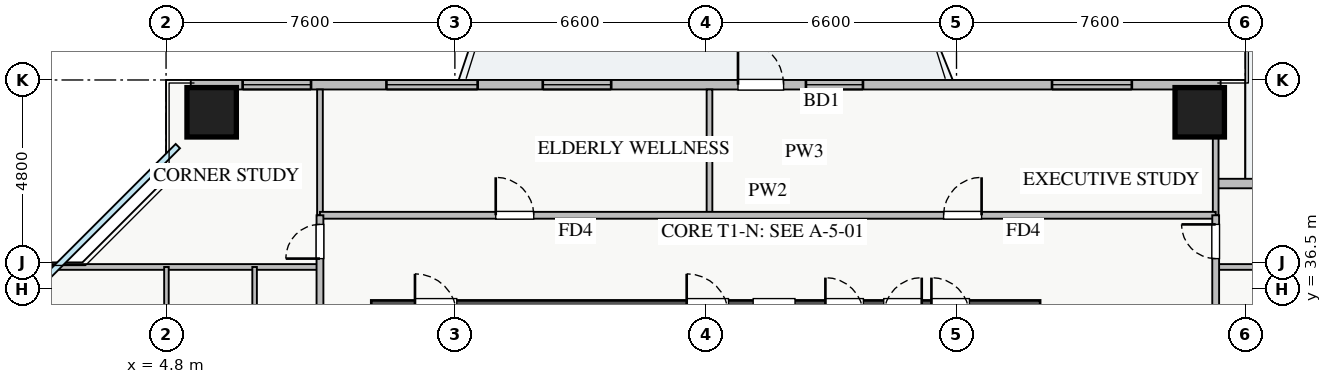
"""IFC4 building model, lengths in metres.
Left out: names, types, materials, properties, quantities, classifications, styles, units other than length and angle.
Written with IfcOpenShell. Run it as: python <this file> out.ifc"""

import sys

from ifc_helpers import new_model, si_unit, direction, frame, frame_2d, origin, origin_2d, place, context, subcontext, project, spatial, rectangle, extrude, source, transform, mapped, element, fill, save


model = new_model("IFC4")
c1 = context("Model", 3, precision=1e-05, world=origin(), true_north=direction((0.0, 1.0)))
c2 = subcontext(c1, "Body", "Model", "MODEL_VIEW")
j1 = project(units=[si_unit("LENGTHUNIT", "METRE"), si_unit("PLANEANGLEUNIT", "RADIAN")], contexts=[c1])
p1 = place(None, origin())
s1 = spatial("IfcSite", under=j1, at=p1, CompositionType="ELEMENT")
p2 = place(p1, origin())
s2 = spatial("IfcBuilding", under=s1, at=p2, CompositionType="ELEMENT")
p3 = place(p2, frame((0.0, 0.0, 82.75)))
s3 = spatial("IfcBuildingStorey", under=s2, at=p3, CompositionType="ELEMENT", Elevation=82.75)
p4 = place(p3, frame((10.2, 35.8, 0.0), z_axis=(0.0, 0.0, 1.0), x_axis=(1.0, 0.0, 0.0)))
e1 = element("IfcWall", 1, at=p4, inside=s3, PredefinedType="SHEAR", context=c2, shape_type="SweptSolid", body=[
    extrude(rectangle(XDim=17.6, YDim=0.8, at=frame_2d((8.8, 0.0))), origin(), (0.0, 0.0, 1.0), 3.25),
])
p5 = place(p4, frame((1.15, 0.0, 0.0)))
e2 = element("IfcOpeningElement", 2, at=p5, cuts=e1, PredefinedType="OPENING", context=c2, shape_type="SweptSolid", body=[
    extrude(rectangle(XDim=1.1, YDim=2.05, at=frame_2d((0.55, 1.025))), frame((0.0, 0.41, 0.0), z_axis=(0.0, -1.0, 0.0), x_axis=(1.0, 0.0, 0.0)), (0.0, 0.0, 1.0), 0.82),
])
p6 = place(p4, frame((8.3, 0.0, 0.0)))
e3 = element("IfcOpeningElement", 3, at=p6, cuts=e1, PredefinedType="OPENING", context=c2, shape_type="SweptSolid", body=[
    extrude(rectangle(XDim=1.1, YDim=2.05, at=frame_2d((0.55, 1.025))), frame((0.0, 0.41, 0.0), z_axis=(0.0, -1.0, 0.0), x_axis=(1.0, 0.0, 0.0)), (0.0, 0.0, 1.0), 0.82),
])
p7 = place(p4, frame((10.05, 0.0, 0.0)))
e4 = element("IfcOpeningElement", 4, at=p7, cuts=e1, PredefinedType="OPENING", context=c2, shape_type="SweptSolid", body=[
    extrude(rectangle(XDim=1.1, YDim=2.05, at=frame_2d((0.55, 1.025))), frame((0.0, 0.41, 0.0), z_axis=(0.0, -1.0, 0.0), x_axis=(1.0, 0.0, 0.0)), (0.0, 0.0, 1.0), 0.82),
])
p8 = place(p4, frame((14.74, 0.0, 0.0)))
e5 = element("IfcOpeningElement", 5, at=p8, cuts=e1, PredefinedType="OPENING", context=c2, shape_type="SweptSolid", body=[
    extrude(rectangle(XDim=1.0, YDim=2.05, at=frame_2d((0.5, 1.025))), frame((0.0, 0.41, 0.0), z_axis=(0.0, -1.0, 0.0), x_axis=(1.0, 0.0, 0.0)), (0.0, 0.0, 1.0), 0.82),
])
p9 = place(p4, frame((11.95, 0.0, 0.0)))
e6 = element("IfcOpeningElement", 6, at=p9, cuts=e1, PredefinedType="OPENING", context=c2, shape_type="SweptSolid", body=[
    extrude(rectangle(XDim=1.0, YDim=2.05, at=frame_2d((0.5, 1.025))), frame((0.0, 0.41, 0.0), z_axis=(0.0, -1.0, 0.0), x_axis=(1.0, 0.0, 0.0)), (0.0, 0.0, 1.0), 0.82),
])
p10 = place(p4, frame((13.485, 0.0, 0.0)))
e7 = element("IfcOpeningElement", 7, at=p10, cuts=e1, PredefinedType="OPENING", context=c2, shape_type="SweptSolid", body=[
    extrude(rectangle(XDim=1.0, YDim=2.05, at=frame_2d((0.5, 1.025))), frame((0.0, 0.41, 0.0), z_axis=(0.0, -1.0, 0.0), x_axis=(1.0, 0.0, 0.0)), (0.0, 0.0, 1.0), 0.82),
])
m1 = source(origin(), c2, "Body", "SweptSolid", [
    extrude(rectangle(XDim=1.3, YDim=1.3, at=origin_2d()), origin(), (0.0, 0.0, 1.0), 3.25),
])
for number, where, z_axis, x_axis in (
    (8, (32.0, 41.15, 0.0), (0.0, 0.0, 1.0), (1.0, 0.0, 0.0)),
    (9, (6.0, 41.15, 0.0), (0.0, 0.0, 1.0), (1.0, 0.0, 0.0)),
):
    element("IfcColumn", number, at=place(p3, frame(where, z_axis=z_axis, x_axis=x_axis)), inside=s3, PredefinedType="COLUMN", context=c2, shape_type="MappedRepresentation", body=[
        mapped(m1, transform((0.0, 0.0, 0.0), x_axis=(1.0, 0.0, 0.0), y_axis=(0.0, 1.0, 0.0), z_axis=(0.0, 0.0, 1.0), scale=1.0)),
    ])
p11 = place(p3, frame((5.45, 41.875, 0.0), z_axis=(0.0, 0.0, 1.0), x_axis=(1.0, 0.0, 0.0)))
e10 = element("IfcWall", 10, at=p11, inside=s3, PredefinedType="STANDARD", context=c2, shape_type="SweptSolid", body=[
    extrude(rectangle(XDim=27.1, YDim=0.25, at=frame_2d((13.55, 0.0))), origin(), (0.0, 0.0, 1.0), 2.61),
])
p12 = place(p11, frame((14.4, 0.0, 0.0)))
e11 = element("IfcOpeningElement", 11, at=p12, cuts=e10, PredefinedType="OPENING", context=c2, shape_type="SweptSolid", body=[
    extrude(rectangle(XDim=1.2, YDim=2.1, at=frame_2d((0.6, 1.05))), frame((0.0, 0.135, 0.0), z_axis=(0.0, -1.0, 0.0), x_axis=(1.0, 0.0, 0.0)), (0.0, 0.0, 1.0), 0.27),
])
p13 = place(p11, frame((1.365, 0.0, 0.9)))
e12 = element("IfcOpeningElement", 12, at=p13, cuts=e10, PredefinedType="OPENING", context=c2, shape_type="SweptSolid", body=[
    extrude(rectangle(XDim=1.8, YDim=1.5, at=frame_2d((0.9, 0.75))), frame((0.0, 0.135, 0.0), z_axis=(0.0, -1.0, 0.0), x_axis=(1.0, 0.0, 0.0)), (0.0, 0.0, 1.0), 0.27),
])
p14 = place(p11, frame((9.263, 0.0, 0.9)))
e13 = element("IfcOpeningElement", 13, at=p14, cuts=e10, PredefinedType="OPENING", context=c2, shape_type="SweptSolid", body=[
    extrude(rectangle(XDim=1.8, YDim=1.45, at=frame_2d((0.9, 0.725))), frame((0.0, 0.135, 0.0), z_axis=(0.0, -1.0, 0.0), x_axis=(1.0, 0.0, 0.0)), (0.0, 0.0, 1.0), 0.27),
])
p15 = place(p11, frame((16.188, 0.0, 0.9)))
e14 = element("IfcOpeningElement", 14, at=p15, cuts=e10, PredefinedType="OPENING", context=c2, shape_type="SweptSolid", body=[
    extrude(rectangle(XDim=1.5, YDim=1.45, at=frame_2d((0.75, 0.725))), frame((0.0, 0.135, 0.0), z_axis=(0.0, -1.0, 0.0), x_axis=(1.0, 0.0, 0.0)), (0.0, 0.0, 1.0), 0.27),
])
p16 = place(p11, frame((22.663, 0.0, 0.9)))
e15 = element("IfcOpeningElement", 15, at=p16, cuts=e10, PredefinedType="OPENING", context=c2, shape_type="SweptSolid", body=[
    extrude(rectangle(XDim=2.1, YDim=1.48, at=frame_2d((1.05, 0.74))), frame((0.0, 0.135, 0.0), z_axis=(0.0, -1.0, 0.0), x_axis=(1.0, 0.0, 0.0)), (0.0, 0.0, 1.0), 0.27),
])
p17 = place(p11, frame((5.149, 0.0, 0.9)))
e16 = element("IfcOpeningElement", 16, at=p17, cuts=e10, PredefinedType="OPENING", context=c2, shape_type="SweptSolid", body=[
    extrude(rectangle(XDim=2.4, YDim=1.5, at=frame_2d((1.2, 0.75))), frame((0.0, 0.135, 0.0), z_axis=(0.0, -1.0, 0.0), x_axis=(1.0, 0.0, 0.0)), (0.0, 0.0, 1.0), 0.27),
])
p18 = place(p3, frame((32.475, 39.275, 0.0), z_axis=(0.0, 0.0, 1.0), x_axis=(1.0, 0.0, 0.0)))
e17 = element("IfcWall", 17, at=p18, inside=s3, PredefinedType="STANDARD", context=c2, shape_type="SweptSolid", body=[
    extrude(rectangle(XDim=2.8, YDim=0.25, at=frame_2d((1.4, 0.0))), origin(), (0.0, 0.0, 1.0), 2.61),
])
p19 = place(p18, frame((1.05, 0.0, 0.0)))
e18 = element("IfcOpeningElement", 18, at=p19, cuts=e17, PredefinedType="OPENING", context=c2, shape_type="SweptSolid", body=[
    extrude(rectangle(XDim=1.2, YDim=2.1, at=frame_2d((0.6, 1.05))), frame((0.0, 0.135, 0.0), z_axis=(0.0, -1.0, 0.0), x_axis=(1.0, 0.0, 0.0)), (0.0, 0.0, 1.0), 0.27),
])
p20 = place(p3, frame((19.1, 38.44, 0.0), z_axis=(0.0, 0.0, 1.0), x_axis=(0.0, 1.0, 0.0)))
e19 = element("IfcWall", 19, at=p20, inside=s3, PredefinedType="PARTITIONING", context=c2, shape_type="SweptSolid", body=[
    extrude(rectangle(XDim=3.31, YDim=0.15, at=frame_2d((1.655, 0.0))), origin(), (0.0, 0.0, 1.0), 2.865),
])
for number, where, z_axis, x_axis in (
    (20, (8.85, 38.44, 0.0), (0.0, 0.0, 1.0), (0.0, 1.0, 0.0)),
    (21, (32.42, 38.44, 0.0), (0.0, 0.0, 1.0), (0.0, 1.0, 0.0)),
):
    element("IfcWall", number, at=place(p3, frame(where, z_axis=z_axis, x_axis=x_axis)), inside=s3, PredefinedType="PARTITIONING", context=c2, shape_type="SweptSolid", body=[
        extrude(rectangle(XDim=3.31, YDim=0.15, at=frame_2d((1.655, 0.0))), origin(), (0.0, 0.0, 1.0), 3.07),
    ])
p21 = place(p3, frame((8.85, 38.44, 0.0), z_axis=(0.0, 0.0, 1.0), x_axis=(1.0, 0.0, 0.0)))
e22 = element("IfcWall", 22, at=p21, inside=s3, PredefinedType="PARTITIONING", context=c2, shape_type="SweptSolid", body=[
    extrude(rectangle(XDim=23.57, YDim=0.18, at=frame_2d((11.785, 0.0))), origin(), (0.0, 0.0, 1.0), 3.07),
])
p22 = place(p21, frame((4.625, 0.0, 0.0)))
e23 = element("IfcOpeningElement", 23, at=p22, cuts=e22, PredefinedType="OPENING", context=c2, shape_type="SweptSolid", body=[
    extrude(rectangle(XDim=1.0, YDim=2.05, at=frame_2d((0.5, 1.025))), frame((0.0, 0.1, 0.0), z_axis=(0.0, -1.0, 0.0), x_axis=(1.0, 0.0, 0.0)), (0.0, 0.0, 1.0), 0.2),
])
p23 = place(p21, frame((16.41, 0.0, 0.0)))
e24 = element("IfcOpeningElement", 24, at=p23, cuts=e22, PredefinedType="OPENING", context=c2, shape_type="SweptSolid", body=[
    extrude(rectangle(XDim=1.0, YDim=2.05, at=frame_2d((0.5, 1.025))), frame((0.0, 0.1, 0.0), z_axis=(0.0, -1.0, 0.0), x_axis=(1.0, 0.0, 0.0)), (0.0, 0.0, 1.0), 0.2),
])
p24 = place(p3, frame((0.25, 37.08, 0.0), z_axis=(0.0, 0.0, 1.0), x_axis=(1.0, 0.0, 0.0)))
e25 = element("IfcWall", 25, at=p24, inside=s3, PredefinedType="PARTITIONING", context=c2, shape_type="SweptSolid", body=[
    extrude(rectangle(XDim=8.6, YDim=0.15, at=frame_2d((4.3, 0.0))), origin(), (0.0, 0.0, 1.0), 3.07),
])
for number, where, z_axis, x_axis in (
    (26, (4.81, 32.14, 0.0), (0.0, 0.0, 1.0), (0.0, 1.0, 0.0)),
    (27, (7.13, 32.14, 0.0), (0.0, 0.0, 1.0), (0.0, 1.0, 0.0)),
):
    element("IfcWall", number, at=place(p3, frame(where, z_axis=z_axis, x_axis=x_axis)), inside=s3, PredefinedType="PLUMBINGWALL", context=c2, shape_type="SweptSolid", body=[
        extrude(rectangle(XDim=4.94, YDim=0.12, at=frame_2d((2.47, 0.0))), origin(), (0.0, 0.0, 1.0), 3.07),
    ])
p25 = place(p3, frame((8.85, 7.21, 0.0), z_axis=(0.0, 0.0, 1.0), x_axis=(0.0, 1.0, 0.0)))
e28 = element("IfcWall", 28, at=p25, inside=s3, PredefinedType="PARTITIONING", context=c2, shape_type="SweptSolid", body=[
    extrude(rectangle(XDim=31.23, YDim=0.18, at=frame_2d((15.615, 0.0))), origin(), (0.0, 0.0, 1.0), 3.07),
])
p26 = place(p25, frame((30.09, 0.0, 0.0)))
e29 = element("IfcOpeningElement", 29, at=p26, cuts=e28, PredefinedType="OPENING", context=c2, shape_type="SweptSolid", body=[
    extrude(rectangle(XDim=0.9, YDim=2.05, at=frame_2d((0.45, 1.025))), frame((0.0, 0.1, 0.0), z_axis=(0.0, -1.0, 0.0), x_axis=(1.0, 0.0, 0.0)), (0.0, 0.0, 1.0), 0.2),
])
p27 = place(p25, frame((0.24, 0.0, 0.0)))
e30 = element("IfcOpeningElement", 30, at=p27, cuts=e28, PredefinedType="OPENING", context=c2, shape_type="SweptSolid", body=[
    extrude(rectangle(XDim=0.9, YDim=2.05, at=frame_2d((0.45, 1.025))), frame((0.0, 0.1, 0.0), z_axis=(0.0, -1.0, 0.0), x_axis=(1.0, 0.0, 0.0)), (0.0, 0.0, 1.0), 0.2),
])
p28 = place(p25, frame((5.895, 0.0, 0.0)))
e31 = element("IfcOpeningElement", 31, at=p28, cuts=e28, PredefinedType="OPENING", context=c2, shape_type="SweptSolid", body=[
    extrude(rectangle(XDim=1.0, YDim=2.05, at=frame_2d((0.5, 1.025))), frame((0.0, 0.1, 0.0), z_axis=(0.0, -1.0, 0.0), x_axis=(1.0, 0.0, 0.0)), (0.0, 0.0, 1.0), 0.2),
])
p29 = place(p25, frame((12.885, 0.0, 0.0)))
e32 = element("IfcOpeningElement", 32, at=p29, cuts=e28, PredefinedType="OPENING", context=c2, shape_type="SweptSolid", body=[
    extrude(rectangle(XDim=1.0, YDim=2.05, at=frame_2d((0.5, 1.025))), frame((0.0, 0.1, 0.0), z_axis=(0.0, -1.0, 0.0), x_axis=(1.0, 0.0, 0.0)), (0.0, 0.0, 1.0), 0.2),
])
p30 = place(p25, frame((21.96, 0.0, 0.0)))
e33 = element("IfcOpeningElement", 33, at=p30, cuts=e28, PredefinedType="OPENING", context=c2, shape_type="SweptSolid", body=[
    extrude(rectangle(XDim=1.0, YDim=2.05, at=frame_2d((0.5, 1.025))), frame((0.0, 0.1, 0.0), z_axis=(0.0, -1.0, 0.0), x_axis=(1.0, 0.0, 0.0)), (0.0, 0.0, 1.0), 0.2),
])
p31 = place(p3, frame((32.42, 37.08, 0.0), z_axis=(0.0, 0.0, 1.0), x_axis=(1.0, 0.0, 0.0)))
e34 = element("IfcWall", 34, at=p31, inside=s3, PredefinedType="PARTITIONING", context=c2, shape_type="SweptSolid", body=[
    extrude(rectangle(XDim=5.33, YDim=0.15, at=frame_2d((2.665, 0.0))), origin(), (0.0, 0.0, 1.0), 3.07),
])
p32 = place(p3, frame((32.42, 7.21, 0.0), z_axis=(0.0, 0.0, 1.0), x_axis=(0.0, 1.0, 0.0)))
e35 = element("IfcWall", 35, at=p32, inside=s3, PredefinedType="PARTITIONING", context=c2, shape_type="SweptSolid", body=[
    extrude(rectangle(XDim=31.23, YDim=0.18, at=frame_2d((15.615, 0.0))), origin(), (0.0, 0.0, 1.0), 2.865),
])
p33 = place(p32, frame((30.09, 0.0, 0.0)))
e36 = element("IfcOpeningElement", 36, at=p33, cuts=e35, PredefinedType="OPENING", context=c2, shape_type="SweptSolid", body=[
    extrude(rectangle(XDim=0.9, YDim=2.05, at=frame_2d((0.45, 1.025))), frame((0.0, 0.1, 0.0), z_axis=(0.0, -1.0, 0.0), x_axis=(1.0, 0.0, 0.0)), (0.0, 0.0, 1.0), 0.2),
])
p34 = place(p32, frame((0.415, 0.0, 0.0)))
e37 = element("IfcOpeningElement", 37, at=p34, cuts=e35, PredefinedType="OPENING", context=c2, shape_type="SweptSolid", body=[
    extrude(rectangle(XDim=0.9, YDim=2.05, at=frame_2d((0.45, 1.025))), frame((0.0, 0.1, 0.0), z_axis=(0.0, -1.0, 0.0), x_axis=(1.0, 0.0, 0.0)), (0.0, 0.0, 1.0), 0.2),
])
p35 = place(p32, frame((5.675, 0.0, 0.0)))
e38 = element("IfcOpeningElement", 38, at=p35, cuts=e35, PredefinedType="OPENING", context=c2, shape_type="SweptSolid", body=[
    extrude(rectangle(XDim=1.0, YDim=2.05, at=frame_2d((0.5, 1.025))), frame((0.0, 0.1, 0.0), z_axis=(0.0, -1.0, 0.0), x_axis=(1.0, 0.0, 0.0)), (0.0, 0.0, 1.0), 0.2),
])
p36 = place(p32, frame((12.575, 0.0, 0.0)))
e39 = element("IfcOpeningElement", 39, at=p36, cuts=e35, PredefinedType="OPENING", context=c2, shape_type="SweptSolid", body=[
    extrude(rectangle(XDim=1.0, YDim=2.05, at=frame_2d((0.5, 1.025))), frame((0.0, 0.1, 0.0), z_axis=(0.0, -1.0, 0.0), x_axis=(1.0, 0.0, 0.0)), (0.0, 0.0, 1.0), 0.2),
])
p37 = place(p32, frame((22.5, 0.0, 0.0)))
e40 = element("IfcOpeningElement", 40, at=p37, cuts=e35, PredefinedType="OPENING", context=c2, shape_type="SweptSolid", body=[
    extrude(rectangle(XDim=1.0, YDim=2.05, at=frame_2d((0.5, 1.025))), frame((0.0, 0.1, 0.0), z_axis=(0.0, -1.0, 0.0), x_axis=(1.0, 0.0, 0.0)), (0.0, 0.0, 1.0), 0.2),
])
m2 = source(origin(), c2, "Body", "SweptSolid", [
    extrude(rectangle(XDim=1.2, YDim=2.1, at=frame_2d((0.6, 1.05))), frame((0.0, 0.025, 0.0), z_axis=(0.0, -1.0, 0.0), x_axis=(1.0, 0.0, 0.0)), (0.0, 0.0, 1.0), 0.05),
])
p38 = place(p12, origin())
e41 = element("IfcDoor", 41, at=p38, inside=s3, OperationType="SINGLE_SWING_LEFT", PredefinedType="DOOR", context=c2, shape_type="MappedRepresentation", body=[
    mapped(m2, transform((0.0, 0.0, 0.0), x_axis=(1.0, 0.0, 0.0), y_axis=(0.0, 1.0, 0.0), z_axis=(0.0, 0.0, 1.0), scale=1.0)),
])
fill(e11, e41)
m3 = source(origin(), c2, "Body", "SweptSolid", [
    extrude(rectangle(XDim=1.8, YDim=1.5, at=frame_2d((0.9, 0.75))), frame((0.0, 0.03, 0.0), z_axis=(0.0, -1.0, 0.0), x_axis=(1.0, 0.0, 0.0)), (0.0, 0.0, 1.0), 0.06),
])
p39 = place(p13, origin())
e42 = element("IfcWindow", 42, at=p39, inside=s3, PartitioningType="TRIPLE_PANEL_VERTICAL", PredefinedType="WINDOW", context=c2, shape_type="MappedRepresentation", body=[
    mapped(m3, transform((0.0, 0.0, 0.0), x_axis=(1.0, 0.0, 0.0), y_axis=(0.0, 1.0, 0.0), z_axis=(0.0, 0.0, 1.0), scale=1.0)),
])
fill(e12, e42)
m4 = source(origin(), c2, "Body", "SweptSolid", [
    extrude(rectangle(XDim=1.8, YDim=1.45, at=frame_2d((0.9, 0.725))), frame((0.0, 0.03, 0.0), z_axis=(0.0, -1.0, 0.0), x_axis=(1.0, 0.0, 0.0)), (0.0, 0.0, 1.0), 0.06),
])
p40 = place(p14, origin())
e43 = element("IfcWindow", 43, at=p40, inside=s3, PartitioningType="DOUBLE_PANEL_VERTICAL", PredefinedType="WINDOW", context=c2, shape_type="MappedRepresentation", body=[
    mapped(m4, transform((0.0, 0.0, 0.0), x_axis=(1.0, 0.0, 0.0), y_axis=(0.0, 1.0, 0.0), z_axis=(0.0, 0.0, 1.0), scale=1.0)),
])
fill(e13, e43)
m5 = source(origin(), c2, "Body", "SweptSolid", [
    extrude(rectangle(XDim=1.5, YDim=1.45, at=frame_2d((0.75, 0.725))), frame((0.0, 0.03, 0.0), z_axis=(0.0, -1.0, 0.0), x_axis=(1.0, 0.0, 0.0)), (0.0, 0.0, 1.0), 0.06),
])
p41 = place(p15, origin())
e44 = element("IfcWindow", 44, at=p41, inside=s3, PartitioningType="DOUBLE_PANEL_VERTICAL", PredefinedType="WINDOW", context=c2, shape_type="MappedRepresentation", body=[
    mapped(m5, transform((0.0, 0.0, 0.0), x_axis=(1.0, 0.0, 0.0), y_axis=(0.0, 1.0, 0.0), z_axis=(0.0, 0.0, 1.0), scale=1.0)),
])
fill(e14, e44)
m6 = source(origin(), c2, "Body", "SweptSolid", [
    extrude(rectangle(XDim=2.1, YDim=1.48, at=frame_2d((1.05, 0.74))), frame((0.0, 0.03, 0.0), z_axis=(0.0, -1.0, 0.0), x_axis=(1.0, 0.0, 0.0)), (0.0, 0.0, 1.0), 0.06),
])
p42 = place(p16, origin())
e45 = element("IfcWindow", 45, at=p42, inside=s3, PartitioningType="TRIPLE_PANEL_VERTICAL", PredefinedType="WINDOW", context=c2, shape_type="MappedRepresentation", body=[
    mapped(m6, transform((0.0, 0.0, 0.0), x_axis=(1.0, 0.0, 0.0), y_axis=(0.0, 1.0, 0.0), z_axis=(0.0, 0.0, 1.0), scale=1.0)),
])
fill(e15, e45)
m7 = source(origin(), c2, "Body", "SweptSolid", [
    extrude(rectangle(XDim=1.0, YDim=2.05, at=frame_2d((0.5, 1.025))), frame((0.0, 0.025, 0.0), z_axis=(0.0, -1.0, 0.0), x_axis=(1.0, 0.0, 0.0)), (0.0, 0.0, 1.0), 0.05),
])
p43 = place(p22, origin())
e46 = element("IfcDoor", 46, at=p43, inside=s3, OperationType="SINGLE_SWING_LEFT", PredefinedType="DOOR", context=c2, shape_type="MappedRepresentation", body=[
    mapped(m7, transform((0.0, 0.0, 0.0), x_axis=(1.0, 0.0, 0.0), y_axis=(0.0, 1.0, 0.0), z_axis=(0.0, 0.0, 1.0), scale=1.0)),
])
fill(e23, e46)
p44 = place(p23, origin())
e47 = element("IfcDoor", 47, at=p44, inside=s3, OperationType="SINGLE_SWING_RIGHT", PredefinedType="DOOR", context=c2, shape_type="MappedRepresentation", body=[
    mapped(m7, transform((0.0, 0.0, 0.0), x_axis=(1.0, 0.0, 0.0), y_axis=(0.0, 1.0, 0.0), z_axis=(0.0, 0.0, 1.0), scale=1.0)),
])
fill(e24, e47)
m8 = source(origin(), c2, "Body", "SweptSolid", [
    extrude(rectangle(XDim=0.9, YDim=2.05, at=frame_2d((0.45, 1.025))), frame((0.0, 0.025, 0.0), z_axis=(0.0, -1.0, 0.0), x_axis=(1.0, 0.0, 0.0)), (0.0, 0.0, 1.0), 0.05),
])
p45 = place(p26, origin())
e48 = element("IfcDoor", 48, at=p45, inside=s3, OperationType="SINGLE_SWING_LEFT", PredefinedType="DOOR", context=c2, shape_type="MappedRepresentation", body=[
    mapped(m8, transform((0.0, 0.0, 0.0), x_axis=(1.0, 0.0, 0.0), y_axis=(0.0, 1.0, 0.0), z_axis=(0.0, 0.0, 1.0), scale=1.0)),
])
fill(e29, e48)
p46 = place(p33, origin())
e49 = element("IfcDoor", 49, at=p46, inside=s3, OperationType="SINGLE_SWING_RIGHT", PredefinedType="DOOR", context=c2, shape_type="MappedRepresentation", body=[
    mapped(m8, transform((0.0, 0.0, 0.0), x_axis=(1.0, 0.0, 0.0), y_axis=(0.0, 1.0, 0.0), z_axis=(0.0, 0.0, 1.0), scale=1.0)),
])
fill(e36, e49)
m9 = source(origin(), c2, "Body", "SweptSolid", [
    extrude(rectangle(XDim=2.4, YDim=1.5, at=frame_2d((1.2, 0.75))), frame((0.0, 0.03, 0.0), z_axis=(0.0, -1.0, 0.0), x_axis=(1.0, 0.0, 0.0)), (0.0, 0.0, 1.0), 0.06),
])
p47 = place(p17, origin())
e50 = element("IfcWindow", 50, at=p47, inside=s3, PartitioningType="TRIPLE_PANEL_VERTICAL", PredefinedType="WINDOW", context=c2, shape_type="MappedRepresentation", body=[
    mapped(m9, transform((0.0, 0.0, 0.0), x_axis=(1.0, 0.0, 0.0), y_axis=(0.0, 1.0, 0.0), z_axis=(0.0, 0.0, 1.0), scale=1.0)),
])
fill(e16, e50)
save(model, sys.argv[1])
